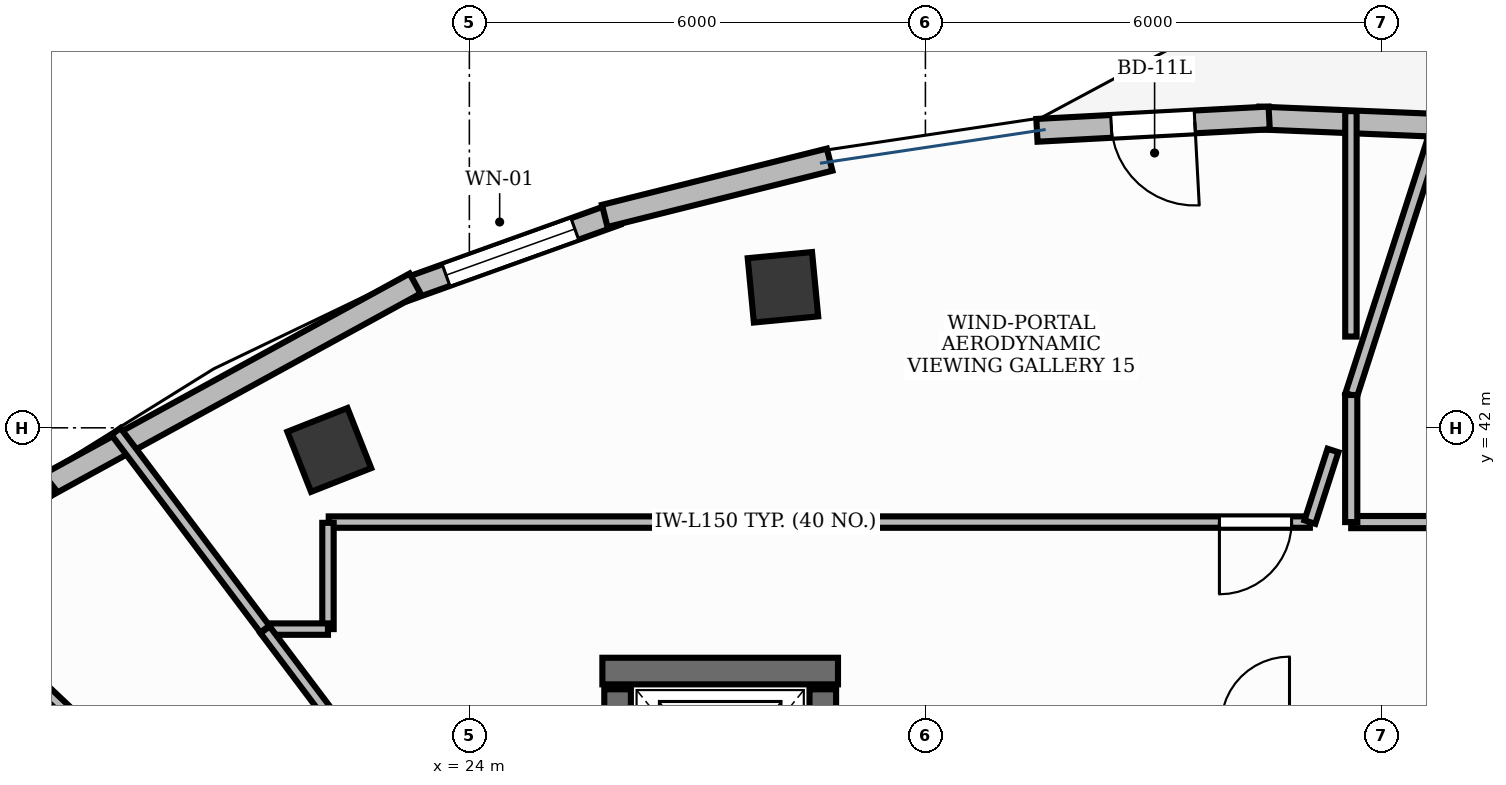
"""IFC4 building model, lengths in metres.
Left out: names, types, materials, properties, quantities, classifications, styles, units other than length and angle.
Written with IfcOpenShell. Run it as: python <this file> out.ifc"""

import sys

from ifc_helpers import new_model, si_unit, direction, frame, frame_2d, origin, origin_2d, place, context, subcontext, project, spatial, rectangle, extrude, element, fill, save


model = new_model("IFC4")
c1 = context("Model", 3, precision=1e-05, world=origin(), true_north=direction((0.0, 1.0)))
c2 = subcontext(c1, "Body", "Model", "MODEL_VIEW")
j1 = project(units=[si_unit("LENGTHUNIT", "METRE"), si_unit("PLANEANGLEUNIT", "RADIAN")], contexts=[c1])
p1 = place(None, origin())
s1 = spatial("IfcSite", under=j1, at=p1, CompositionType="ELEMENT")
p2 = place(p1, origin())
s2 = spatial("IfcBuilding", under=s1, at=p2, CompositionType="ELEMENT")
p3 = place(p2, frame((0.0, 0.0, 291.0)))
s3 = spatial("IfcBuildingStorey", under=s2, at=p3, CompositionType="ELEMENT", Elevation=291.0)
p4 = place(p3, frame((25.75, 38.8, 0.0), z_axis=(0.0, 0.0, 1.0), x_axis=(1.0, 0.0, 0.0)))
e1 = element("IfcWall", 1, at=p4, inside=s3, PredefinedType="SHEAR", context=c2, shape_type="SweptSolid", body=[
    extrude(rectangle(XDim=3.1, YDim=0.35, at=frame_2d((1.55, 0.0))), origin(), (0.0, 0.0, 1.0), 6.3),
])
for number, where, z_axis, x_axis in (
    (2, (25.95, 35.86, 0.0), (0.0, 0.0, 1.0), (0.0, 1.0, 0.0)),
    (3, (28.65, 35.86, 0.0), (0.0, 0.0, 1.0), (0.0, 1.0, 0.0)),
):
    element("IfcWall", number, at=place(p3, frame(where, z_axis=z_axis, x_axis=x_axis)), inside=s3, PredefinedType="SHEAR", context=c2, shape_type="SweptSolid", body=[
        extrude(rectangle(XDim=2.7, YDim=0.35, at=frame_2d((1.35, 0.0))), origin(), (0.0, 0.0, 1.0), 6.3),
    ])
for number, where, z_axis, x_axis in (
    (4, (28.126, 43.849, -0.0), (0.0, 0.0, 1.0), (0.995, 0.095, 0.0)),
    (5, (22.157, 41.709, -0.0), (0.0, 0.0, 1.0), (0.93, 0.367, 0.0)),
):
    element("IfcColumn", number, at=place(p3, frame(where, z_axis=z_axis, x_axis=x_axis)), inside=s3, PredefinedType="COLUMN", context=c2, shape_type="SweptSolid", body=[
        extrude(rectangle(XDim=0.85, YDim=0.85, at=origin_2d()), origin(), (0.0, 0.0, 1.0), 6.301),
    ])
p5 = place(p3, frame((37.446, 45.95, 0.0), z_axis=(0.0, 0.0, 1.0), x_axis=(-0.999155735102, 0.041083050186, 0.0)))
e6 = element("IfcWall", 6, at=p5, inside=s3, PredefinedType="STANDARD", context=c2, shape_type="SweptSolid", body=[
    extrude(rectangle(XDim=3.061, YDim=0.3, at=frame_2d((1.53, 0.0))), origin(), (0.0, 0.0, 1.0), 6.3),
])
p6 = place(p3, frame((34.522, 46.077, 0.0), z_axis=(0.0, 0.0, 1.0), x_axis=(-0.998578313912, -0.053304324252, 0.0)))
e7 = element("IfcWall", 7, at=p6, inside=s3, PredefinedType="STANDARD", context=c2, shape_type="SweptSolid", body=[
    extrude(rectangle(XDim=3.06, YDim=0.3, at=frame_2d((1.53, 0.0))), origin(), (0.0, 0.0, 1.0), 6.3),
])
p7 = place(p6, frame((0.98, 0.0, 0.0)))
e8 = element("IfcOpeningElement", 8, at=p7, cuts=e7, PredefinedType="OPENING", context=c2, shape_type="SweptSolid", body=[
    extrude(rectangle(XDim=1.1, YDim=2.15, at=frame_2d((0.55, 1.075))), frame((0.0, 0.165, 0.0), z_axis=(0.0, -1.0, 0.0), x_axis=(1.0, 0.0, 0.0)), (0.0, 0.0, 1.0), 0.33),
])
p8 = place(p3, frame((25.935, 44.813, 0.0), z_axis=(0.0, 0.0, 1.0), x_axis=(-0.941228252746, -0.337771189169, 0.0)))
e9 = element("IfcWall", 9, at=p8, inside=s3, PredefinedType="STANDARD", context=c2, shape_type="SweptSolid", body=[
    extrude(rectangle(XDim=2.963, YDim=0.3, at=frame_2d((1.482, 0.0))), origin(), (0.0, 0.0, 1.0), 6.3),
])
p9 = place(p8, frame((0.582, 0.0, 0.9)))
e10 = element("IfcOpeningElement", 10, at=p9, cuts=e9, PredefinedType="OPENING", context=c2, shape_type="SweptSolid", body=[
    extrude(rectangle(XDim=1.8, YDim=2.1, at=frame_2d((0.9, 1.05))), frame((0.0, 0.165, 0.0), z_axis=(0.0, -1.0, 0.0), x_axis=(1.0, 0.0, 0.0)), (0.0, 0.0, 1.0), 0.33),
])
p10 = place(p3, frame((28.74, 45.528, 0.0), z_axis=(0.0, 0.0, 1.0), x_axis=(-0.970100107053, -0.242705134465, 0.0)))
e11 = element("IfcWall", 11, at=p10, inside=s3, PredefinedType="STANDARD", context=c2, shape_type="SweptSolid", body=[
    extrude(rectangle(XDim=3.05, YDim=0.3, at=frame_2d((1.525, 0.0))), origin(), (0.0, 0.0, 1.0), 6.3),
])
p11 = place(p3, frame((23.286, 43.898, 0.0), z_axis=(0.0, 0.0, 1.0), x_axis=(-0.877062479499, -0.480376318166, 0.0)))
e12 = element("IfcWall", 12, at=p11, inside=s3, PredefinedType="STANDARD", context=c2, shape_type="SweptSolid", body=[
    extrude(rectangle(XDim=5.654, YDim=0.3, at=frame_2d((2.827, 0.0))), origin(), (0.0, 0.0, 1.0), 5.87),
])
p12 = place(p3, frame((18.48, 41.283, 0.0), z_axis=(0.0, 0.0, 1.0), x_axis=(-0.784028163495, -0.620725252303, 0.0)))
e13 = element("IfcWall", 13, at=p12, inside=s3, PredefinedType="STANDARD", context=c2, shape_type="SweptSolid", body=[
    extrude(rectangle(XDim=2.803, YDim=0.3, at=frame_2d((1.402, 0.0))), origin(), (0.0, 0.0, 1.0), 5.87),
])
p13 = place(p3, frame((39.2, 40.76, 0.0), z_axis=(0.0, 0.0, 1.0), x_axis=(-1.0, 0.0, 0.0)))
e14 = element("IfcWall", 14, at=p13, inside=s3, PredefinedType="PARTITIONING", context=c2, shape_type="SweptSolid", body=[
    extrude(rectangle(XDim=3.598, YDim=0.16, at=frame_2d((1.799, 0.0))), origin(), (0.0, 0.0, 1.0), 4.61),
])
p14 = place(p13, frame((1.051, 0.0, 0.0)))
e15 = element("IfcOpeningElement", 15, at=p14, cuts=e14, PredefinedType="OPENING", context=c2, shape_type="SweptSolid", body=[
    extrude(rectangle(XDim=0.95, YDim=2.15, at=frame_2d((0.475, 1.075))), frame((0.0, 0.095, 0.0), z_axis=(0.0, -1.0, 0.0), x_axis=(1.0, 0.0, 0.0)), (0.0, 0.0, 1.0), 0.19),
])
p15 = place(p3, frame((35.058, 40.76, 0.0), z_axis=(0.0, 0.0, 1.0), x_axis=(-1.0, 0.0, 0.0)))
e16 = element("IfcWall", 16, at=p15, inside=s3, PredefinedType="PARTITIONING", context=c2, shape_type="SweptSolid", body=[
    extrude(rectangle(XDim=12.908, YDim=0.15, at=frame_2d((6.454, 0.0))), origin(), (0.0, 0.0, 1.0), 4.61),
])
p16 = place(p15, frame((0.24, 0.0, 0.0)))
e17 = element("IfcOpeningElement", 17, at=p16, cuts=e16, PredefinedType="OPENING", context=c2, shape_type="SweptSolid", body=[
    extrude(rectangle(XDim=0.95, YDim=2.15, at=frame_2d((0.475, 1.075))), frame((0.0, 0.09, 0.0), z_axis=(0.0, -1.0, 0.0), x_axis=(1.0, 0.0, 0.0)), (0.0, 0.0, 1.0), 0.18),
])
p17 = place(p3, frame((35.602, 42.432, 0.0), z_axis=(0.0, 0.0, 1.0), x_axis=(0.307338900837, 0.95160012612, 0.0)))
e18 = element("IfcWall", 18, at=p17, inside=s3, PredefinedType="PARTITIONING", context=c2, shape_type="SweptSolid", body=[
    extrude(rectangle(XDim=3.862, YDim=0.16, at=frame_2d((1.931, 0.0))), origin(), (0.0, 0.0, 1.0), 4.61),
])
p18 = place(p3, frame((35.602, 40.76, 0.0), z_axis=(0.0, 0.0, 1.0), x_axis=(0.0, 1.0, 0.0)))
e19 = element("IfcWall", 19, at=p18, inside=s3, PredefinedType="PARTITIONING", context=c2, shape_type="SweptSolid", body=[
    extrude(rectangle(XDim=1.672, YDim=0.16, at=frame_2d((0.836, 0.0))), origin(), (0.0, 0.0, 1.0), 4.61),
])
p19 = place(p3, frame((35.598, 46.166, 0.0), z_axis=(0.0, 0.0, 1.0), x_axis=(0.0, -1.0, 0.0)))
e20 = element("IfcWall", 20, at=p19, inside=s3, PredefinedType="PARTITIONING", context=c2, shape_type="SweptSolid", body=[
    extrude(rectangle(XDim=2.965, YDim=0.15, at=frame_2d((1.483, 0.0))), origin(), (0.0, 0.0, 1.0), 4.61),
])
p20 = place(p3, frame((35.362, 41.702, 0.0), z_axis=(0.0, 0.0, 1.0), x_axis=(-0.307334271647, -0.9516016212, 0.0)))
e21 = element("IfcWall", 21, at=p20, inside=s3, PredefinedType="PARTITIONING", context=c2, shape_type="SweptSolid", body=[
    extrude(rectangle(XDim=0.99, YDim=0.15, at=frame_2d((0.495, 0.0))), origin(), (0.0, 0.0, 1.0), 4.61),
])
p21 = place(p3, frame((22.14, 40.75, 0.0), z_axis=(0.0, 0.0, 1.0), x_axis=(0.0, -1.0, 0.0)))
e22 = element("IfcWall", 22, at=p21, inside=s3, PredefinedType="PARTITIONING", context=c2, shape_type="SweptSolid", body=[
    extrude(rectangle(XDim=1.398, YDim=0.15, at=frame_2d((0.699, 0.0))), origin(), (0.0, 0.0, 1.0), 4.61),
])
p22 = place(p3, frame((22.14, 39.352, 0.0), z_axis=(0.0, 0.0, 1.0), x_axis=(-1.0, 0.0, 0.0)))
e23 = element("IfcWall", 23, at=p22, inside=s3, PredefinedType="PARTITIONING", context=c2, shape_type="SweptSolid", body=[
    extrude(rectangle(XDim=0.83, YDim=0.15, at=frame_2d((0.415, 0.0))), origin(), (0.0, 0.0, 1.0), 4.61),
])
p23 = place(p3, frame((21.31, 39.352, 0.0), z_axis=(0.0, 0.0, 1.0), x_axis=(-0.601810040337, 0.798639264843, 0.0)))
e24 = element("IfcWall", 24, at=p23, inside=s3, PredefinedType="PARTITIONING", context=c2, shape_type="SweptSolid", body=[
    extrude(rectangle(XDim=3.256, YDim=0.15, at=frame_2d((1.628, 0.0))), origin(), (0.0, 0.0, 1.0), 4.61),
])
p24 = place(p3, frame((21.312, 39.342, 0.0), z_axis=(0.0, 0.0, 1.0), x_axis=(0.601759967569, -0.79867699443, 0.0)))
e25 = element("IfcWall", 25, at=p24, inside=s3, PredefinedType="PARTITIONING", context=c2, shape_type="SweptSolid", body=[
    extrude(rectangle(XDim=1.375, YDim=0.15, at=frame_2d((0.688, 0.0))), origin(), (0.0, 0.0, 1.0), 4.61),
])
p25 = place(p3, frame((22.14, 35.018, 0.0), z_axis=(0.0, 0.0, 1.0), x_axis=(-0.726568240796, 0.68709431046, 0.0)))
e26 = element("IfcWall", 26, at=p25, inside=s3, PredefinedType="PARTITIONING", context=c2, shape_type="SweptSolid", body=[
    extrude(rectangle(XDim=6.302, YDim=0.15, at=frame_2d((3.151, 0.0))), origin(), (0.0, 0.0, 1.0), 4.61),
])
p26 = place(p7, origin())
e27 = element("IfcDoor", 27, at=p26, inside=s3, OperationType="SINGLE_SWING_LEFT", PredefinedType="DOOR", context=c2, shape_type="SweptSolid", body=[
    extrude(rectangle(XDim=1.1, YDim=2.15, at=frame_2d((0.55, 1.075))), frame((0.0, 0.025, 0.0), z_axis=(0.0, -1.0, 0.0), x_axis=(1.0, 0.0, 0.0)), (0.0, 0.0, 1.0), 0.05),
])
fill(e8, e27)
p27 = place(p9, origin())
e28 = element("IfcWindow", 28, at=p27, inside=s3, PartitioningType="SINGLE_PANEL", PredefinedType="WINDOW", context=c2, shape_type="SweptSolid", body=[
    extrude(rectangle(XDim=1.8, YDim=2.1, at=frame_2d((0.9, 1.05))), frame((0.0, 0.03, 0.0), z_axis=(0.0, -1.0, 0.0), x_axis=(1.0, 0.0, 0.0)), (0.0, 0.0, 1.0), 0.06),
])
fill(e10, e28)
p28 = place(p16, origin())
e29 = element("IfcDoor", 29, at=p28, inside=s3, OperationType="SINGLE_SWING_RIGHT", PredefinedType="DOOR", context=c2, shape_type="SweptSolid", body=[
    extrude(rectangle(XDim=0.95, YDim=2.15, at=frame_2d((0.475, 1.075))), frame((0.0, 0.025, 0.0), z_axis=(0.0, -1.0, 0.0), x_axis=(1.0, 0.0, 0.0)), (0.0, 0.0, 1.0), 0.05),
])
fill(e17, e29)
save(model, sys.argv[1])
